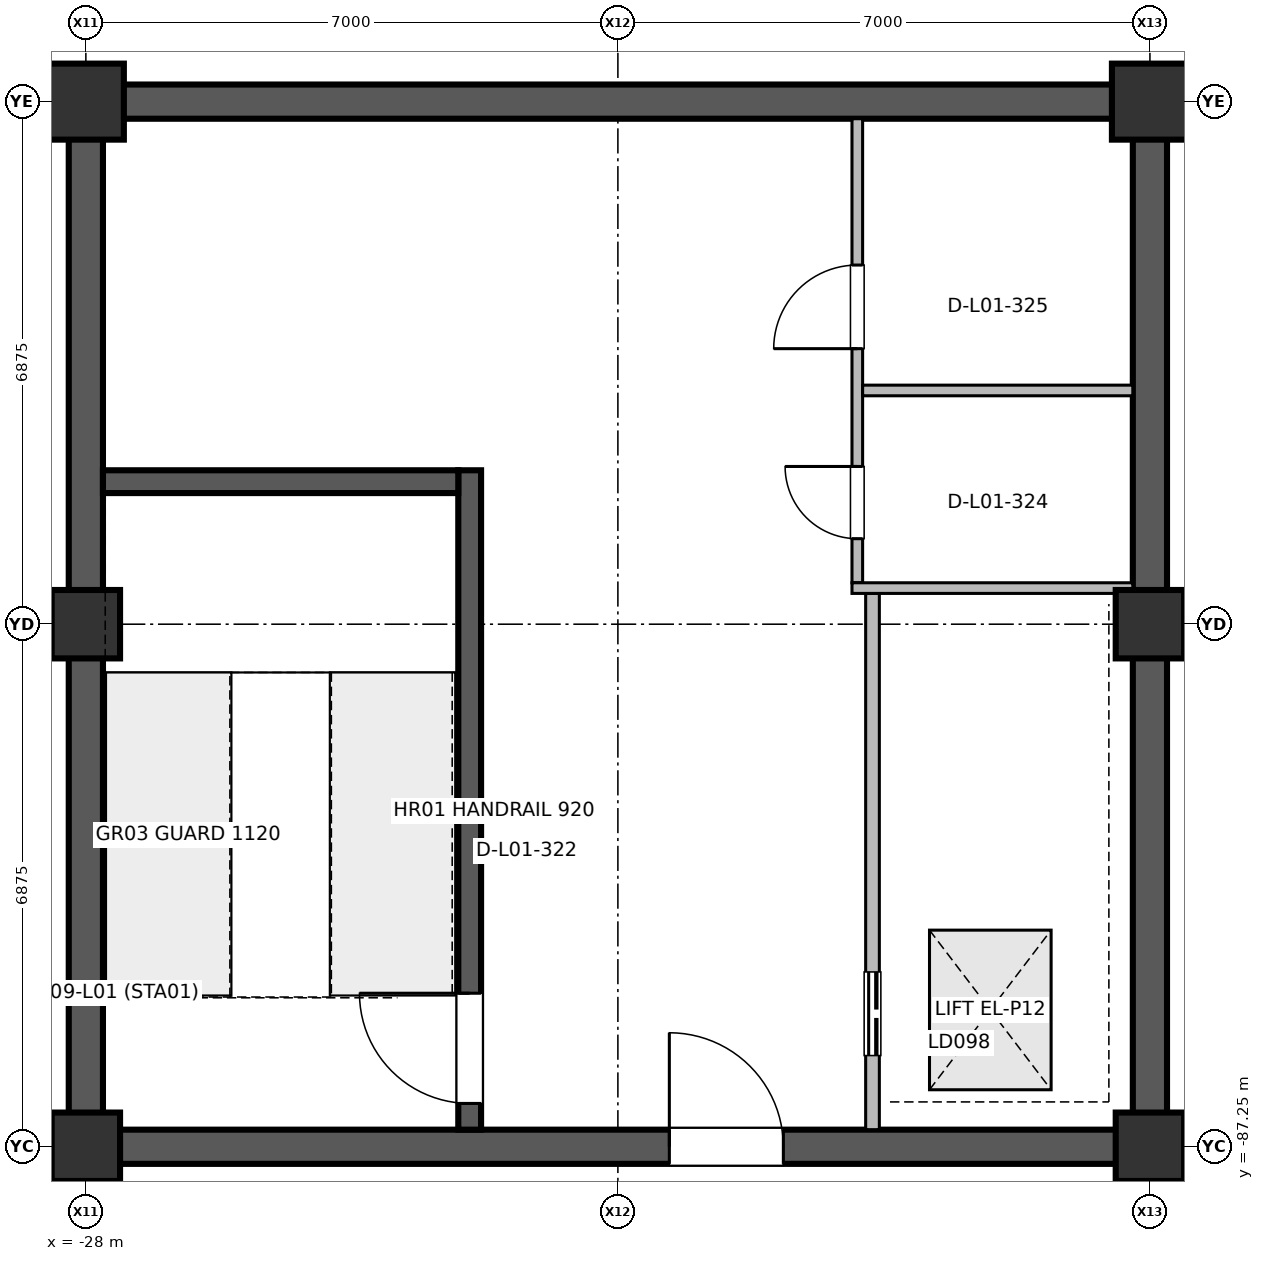
"""IFC4 building model, lengths in metres.
Left out: names, types, materials, properties, quantities, classifications, styles, units other than length and angle.
Written with IfcOpenShell. Run it as: python <this file> out.ifc"""

import sys

from ifc_helpers import new_model, si_unit, direction, frame, frame_2d, origin, origin_2d, place, context, subcontext, project, spatial, rectangle, extrude, element, fill, save


model = new_model("IFC4")
c1 = context("Model", 3, precision=1e-05, world=origin(), true_north=direction((0.0, 1.0)))
c2 = subcontext(c1, "Body", "Model", "MODEL_VIEW")
j1 = project(units=[si_unit("LENGTHUNIT", "METRE"), si_unit("PLANEANGLEUNIT", "RADIAN")], contexts=[c1])
p1 = place(None, origin())
s1 = spatial("IfcSite", under=j1, at=p1, CompositionType="ELEMENT")
p2 = place(p1, origin())
s2 = spatial("IfcBuilding", under=s1, at=p2, CompositionType="ELEMENT")
p3 = place(p2, origin())
s3 = spatial("IfcBuildingStorey", under=s2, at=p3, CompositionType="ELEMENT", Elevation=0.0)
for number, where, z_axis, x_axis in (
    (1, (-28.0, -87.25, 0.0), (0.0, 0.0, 1.0), (1.0, 0.0, 0.0)),
    (2, (-28.0, -80.375, 0.0), (0.0, 0.0, 1.0), (1.0, 0.0, 0.0)),
):
    element("IfcColumn", number, at=place(p3, frame(where, z_axis=z_axis, x_axis=x_axis)), inside=s3, PredefinedType="COLUMN", context=c2, shape_type="SweptSolid", body=[
        extrude(rectangle(XDim=0.9, YDim=0.9, at=origin_2d()), origin(), (0.0, 0.0, 1.0), 5.998),
    ])
p4 = place(p3, frame((-28.0, -73.5, 0.0), z_axis=(0.0, 0.0, 1.0), x_axis=(1.0, 0.0, 0.0)))
e3 = element("IfcColumn", 3, at=p4, inside=s3, PredefinedType="COLUMN", context=c2, shape_type="SweptSolid", body=[
    extrude(rectangle(XDim=1.0, YDim=1.0, at=origin_2d()), origin(), (0.0, 0.0, 1.0), 5.998),
])
for number, where, z_axis, x_axis in (
    (4, (-14.0, -87.25, 0.0), (0.0, 0.0, 1.0), (1.0, 0.0, 0.0)),
    (5, (-14.0, -80.375, 0.0), (0.0, 0.0, 1.0), (1.0, 0.0, 0.0)),
):
    element("IfcColumn", number, at=place(p3, frame(where, z_axis=z_axis, x_axis=x_axis)), inside=s3, PredefinedType="COLUMN", context=c2, shape_type="SweptSolid", body=[
        extrude(rectangle(XDim=0.9, YDim=0.9, at=origin_2d()), origin(), (0.0, 0.0, 1.0), 5.998),
    ])
p5 = place(p3, frame((-14.0, -73.5, 0.0), z_axis=(0.0, 0.0, 1.0), x_axis=(1.0, 0.0, 0.0)))
e6 = element("IfcColumn", 6, at=p5, inside=s3, PredefinedType="COLUMN", context=c2, shape_type="SweptSolid", body=[
    extrude(rectangle(XDim=1.0, YDim=1.0, at=origin_2d()), origin(), (0.0, 0.0, 1.0), 5.998),
])
for number, where, z_axis, x_axis in (
    (7, (-28.0, -87.025, 0.0), (0.0, 0.0, 1.0), (0.0, 1.0, 0.0)),
    (8, (-14.0, -87.025, 0.0), (0.0, 0.0, 1.0), (0.0, 1.0, 0.0)),
):
    element("IfcWall", number, at=place(p3, frame(where, z_axis=z_axis, x_axis=x_axis)), inside=s3, PredefinedType="SHEAR", context=c2, shape_type="SweptSolid", body=[
        extrude(rectangle(XDim=13.3, YDim=0.45, at=frame_2d((6.65, 0.0))), origin(), (0.0, 0.0, 1.0), 5.78),
    ])
p6 = place(p3, frame((-27.775, -87.25, 0.0), z_axis=(0.0, 0.0, 1.0), x_axis=(1.0, 0.0, 0.0)))
e9 = element("IfcWall", 9, at=p6, inside=s3, PredefinedType="SHEAR", context=c2, shape_type="SweptSolid", body=[
    extrude(rectangle(XDim=13.55, YDim=0.45, at=frame_2d((6.775, 0.0))), origin(), (0.0, 0.0, 1.0), 5.78),
])
p7 = place(p6, frame((7.452, 0.0, 0.0)))
e10 = element("IfcOpeningElement", 10, at=p7, cuts=e9, PredefinedType="OPENING", context=c2, shape_type="SweptSolid", body=[
    extrude(rectangle(XDim=1.5, YDim=2.2, at=frame_2d((0.75, 1.1))), frame((0.0, 0.235, 0.0), z_axis=(0.0, -1.0, 0.0), x_axis=(1.0, 0.0, 0.0)), (0.0, 0.0, 1.0), 0.47),
])
p8 = place(p3, frame((-27.775, -73.5, 0.0), z_axis=(0.0, 0.0, 1.0), x_axis=(1.0, 0.0, 0.0)))
e11 = element("IfcWall", 11, at=p8, inside=s3, PredefinedType="SHEAR", context=c2, shape_type="SweptSolid", body=[
    extrude(rectangle(XDim=13.55, YDim=0.45, at=frame_2d((6.775, 0.0))), origin(), (0.0, 0.0, 1.0), 5.78),
])
p9 = place(p3, frame((-22.95, -87.025, 0.0), z_axis=(0.0, 0.0, 1.0), x_axis=(0.0, 1.0, 0.0)))
e12 = element("IfcWall", 12, at=p9, inside=s3, PredefinedType="SHEAR", context=c2, shape_type="SweptSolid", body=[
    extrude(rectangle(XDim=8.675, YDim=0.3, at=frame_2d((4.337, 0.0))), origin(), (0.0, 0.0, 1.0), 5.78),
])
p10 = place(p9, frame((0.345, 0.0, 0.0)))
e13 = element("IfcOpeningElement", 13, at=p10, cuts=e12, PredefinedType="OPENING", context=c2, shape_type="SweptSolid", body=[
    extrude(rectangle(XDim=1.45, YDim=2.2, at=frame_2d((0.725, 1.1))), frame((0.0, 0.16, 0.0), z_axis=(0.0, -1.0, 0.0), x_axis=(1.0, 0.0, 0.0)), (0.0, 0.0, 1.0), 0.32),
])
p11 = place(p3, frame((-17.65, -87.025, 0.0), z_axis=(0.0, 0.0, 1.0), x_axis=(0.0, 1.0, 0.0)))
e14 = element("IfcWall", 14, at=p11, inside=s3, PredefinedType="PARTITIONING", context=c2, shape_type="SweptSolid", body=[
    extrude(rectangle(XDim=7.055, YDim=0.18, at=frame_2d((3.527, 0.0))), origin(), (0.0, 0.0, 1.0), 5.02),
])
p12 = place(p11, frame((0.975, 0.0, 0.0)))
e15 = element("IfcOpeningElement", 15, at=p12, cuts=e14, PredefinedType="OPENING", context=c2, shape_type="SweptSolid", body=[
    extrude(rectangle(XDim=1.1, YDim=2.2, at=frame_2d((0.55, 1.1))), frame((0.0, 0.1, 0.0), z_axis=(0.0, -1.0, 0.0), x_axis=(1.0, 0.0, 0.0)), (0.0, 0.0, 1.0), 0.2),
])
p13 = place(p3, frame((-17.85, -79.83, 0.0), z_axis=(0.0, 0.0, 1.0), x_axis=(0.0, 1.0, 0.0)))
e16 = element("IfcWall", 16, at=p13, inside=s3, PredefinedType="PARTITIONING", context=c2, shape_type="SweptSolid", body=[
    extrude(rectangle(XDim=6.105, YDim=0.14, at=frame_2d((3.052, 0.0))), origin(), (0.0, 0.0, 1.0), 5.02),
])
p14 = place(p13, frame((0.58, 0.0, 0.0)))
e17 = element("IfcOpeningElement", 17, at=p14, cuts=e16, PredefinedType="OPENING", context=c2, shape_type="SweptSolid", body=[
    extrude(rectangle(XDim=0.95, YDim=2.15, at=frame_2d((0.475, 1.075))), frame((0.0, 0.08, 0.0), z_axis=(0.0, -1.0, 0.0), x_axis=(1.0, 0.0, 0.0)), (0.0, 0.0, 1.0), 0.16),
])
p15 = place(p13, frame((3.08, 0.0, 0.0)))
e18 = element("IfcOpeningElement", 18, at=p15, cuts=e16, PredefinedType="OPENING", context=c2, shape_type="SweptSolid", body=[
    extrude(rectangle(XDim=1.1, YDim=2.15, at=frame_2d((0.55, 1.075))), frame((0.0, 0.08, 0.0), z_axis=(0.0, -1.0, 0.0), x_axis=(1.0, 0.0, 0.0)), (0.0, 0.0, 1.0), 0.16),
])
p16 = place(p3, frame((-17.92, -79.9, 0.0), z_axis=(0.0, 0.0, 1.0), x_axis=(1.0, 0.0, 0.0)))
e19 = element("IfcWall", 19, at=p16, inside=s3, PredefinedType="PARTITIONING", context=c2, shape_type="SweptSolid", body=[
    extrude(rectangle(XDim=3.695, YDim=0.14, at=frame_2d((1.847, 0.0))), origin(), (0.0, 0.0, 1.0), 5.02),
])
p17 = place(p3, frame((-17.78, -77.3, 0.0), z_axis=(0.0, 0.0, 1.0), x_axis=(1.0, 0.0, 0.0)))
e20 = element("IfcWall", 20, at=p17, inside=s3, PredefinedType="PARTITIONING", context=c2, shape_type="SweptSolid", body=[
    extrude(rectangle(XDim=3.555, YDim=0.14, at=frame_2d((1.777, 0.0))), origin(), (0.0, 0.0, 1.0), 5.02),
])
p18 = place(p3, frame((-27.775, -78.5, 0.0), z_axis=(0.0, 0.0, 1.0), x_axis=(1.0, 0.0, 0.0)))
e21 = element("IfcWall", 21, at=p18, inside=s3, PredefinedType="SHEAR", context=c2, shape_type="SweptSolid", body=[
    extrude(rectangle(XDim=4.675, YDim=0.3, at=frame_2d((2.337, 0.0))), origin(), (0.0, 0.0, 1.0), 5.78),
])
p19 = place(p7, origin())
e22 = element("IfcDoor", 22, at=p19, inside=s3, OperationType="SINGLE_SWING_LEFT", PredefinedType="DOOR", context=c2, shape_type="SweptSolid", body=[
    extrude(rectangle(XDim=1.5, YDim=2.2, at=frame_2d((0.75, 1.1))), frame((0.0, 0.025, 0.0), z_axis=(0.0, -1.0, 0.0), x_axis=(1.0, 0.0, 0.0)), (0.0, 0.0, 1.0), 0.05),
])
fill(e10, e22)
p20 = place(p10, origin())
e23 = element("IfcDoor", 23, at=p20, inside=s3, OperationType="SINGLE_SWING_RIGHT", PredefinedType="DOOR", context=c2, shape_type="SweptSolid", body=[
    extrude(rectangle(XDim=1.45, YDim=2.2, at=frame_2d((0.725, 1.1))), frame((0.0, 0.025, 0.0), z_axis=(0.0, -1.0, 0.0), x_axis=(1.0, 0.0, 0.0)), (0.0, 0.0, 1.0), 0.05),
])
fill(e13, e23)
p21 = place(p12, origin())
e24 = element("IfcDoor", 24, at=p21, inside=s3, OperationType="DOUBLE_DOOR_SLIDING", PredefinedType="DOOR", context=c2, shape_type="SweptSolid", body=[
    extrude(rectangle(XDim=1.1, YDim=2.2, at=frame_2d((0.55, 1.1))), frame((0.0, 0.025, 0.0), z_axis=(0.0, -1.0, 0.0), x_axis=(1.0, 0.0, 0.0)), (0.0, 0.0, 1.0), 0.05),
])
fill(e15, e24)
p22 = place(p14, origin())
e25 = element("IfcDoor", 25, at=p22, inside=s3, OperationType="SINGLE_SWING_RIGHT", PredefinedType="DOOR", context=c2, shape_type="SweptSolid", body=[
    extrude(rectangle(XDim=0.95, YDim=2.15, at=frame_2d((0.475, 1.075))), frame((0.0, 0.025, 0.0), z_axis=(0.0, -1.0, 0.0), x_axis=(1.0, 0.0, 0.0)), (0.0, 0.0, 1.0), 0.05),
])
fill(e17, e25)
p23 = place(p15, origin())
e26 = element("IfcDoor", 26, at=p23, inside=s3, OperationType="SINGLE_SWING_LEFT", PredefinedType="DOOR", context=c2, shape_type="SweptSolid", body=[
    extrude(rectangle(XDim=1.1, YDim=2.15, at=frame_2d((0.55, 1.075))), frame((0.0, 0.025, 0.0), z_axis=(0.0, -1.0, 0.0), x_axis=(1.0, 0.0, 0.0)), (0.0, 0.0, 1.0), 0.05),
])
fill(e18, e26)
save(model, sys.argv[1])
